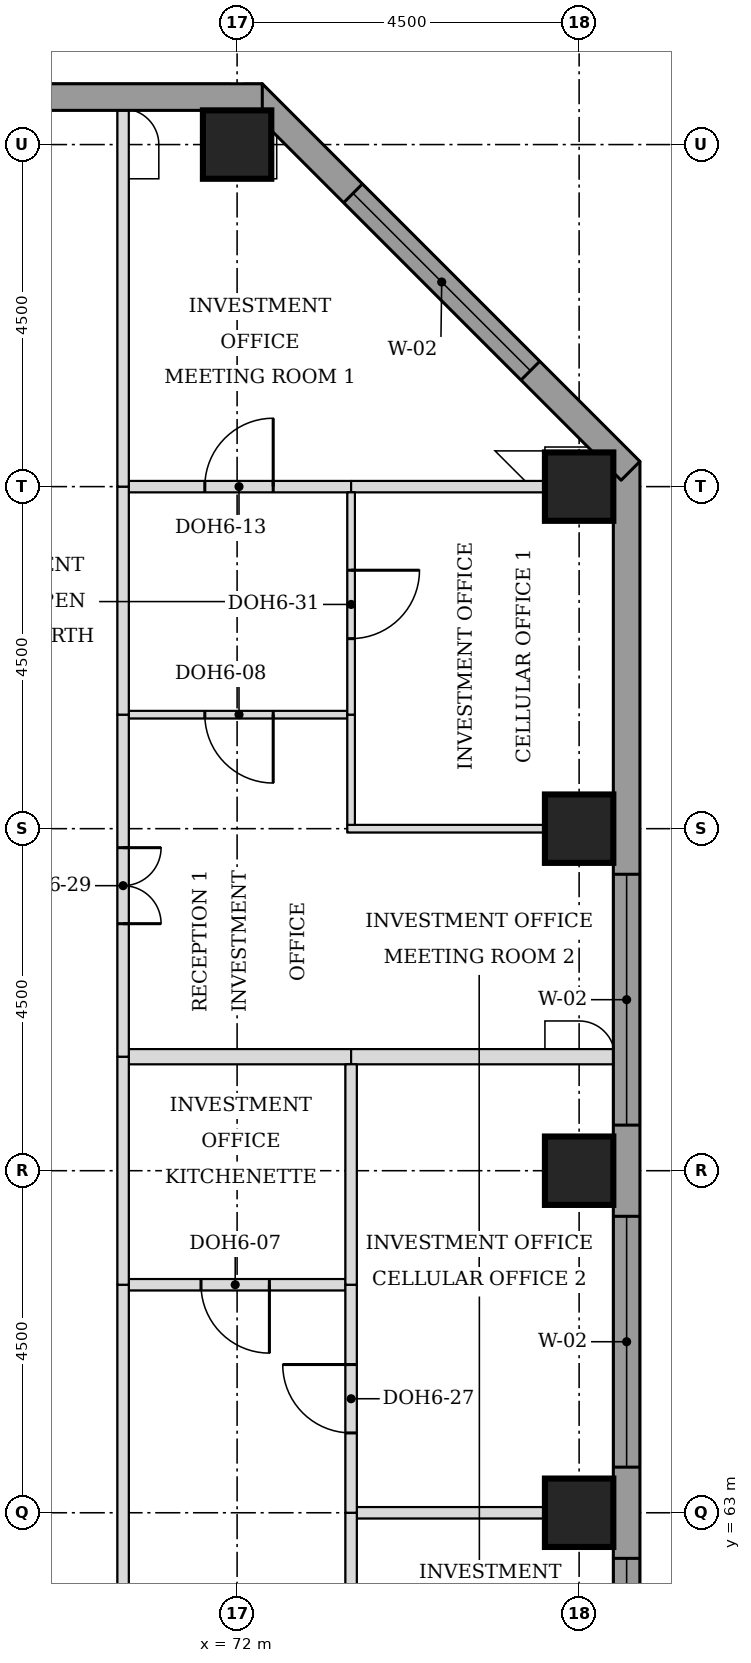
"""IFC4 building model, lengths in metres.
Left out: names, types, materials, properties, quantities, classifications, styles, units other than length and angle.
Written with IfcOpenShell. Run it as: python <this file> out.ifc"""

import sys

from ifc_helpers import new_model, si_unit, direction, frame, frame_2d, origin, origin_2d, place, context, subcontext, project, spatial, rectangle, extrude, element, fill, save


model = new_model("IFC4")
c1 = context("Model", 3, precision=1e-05, world=origin(), true_north=direction((0.0, 1.0)))
c2 = subcontext(c1, "Body", "Model", "MODEL_VIEW")
j1 = project(units=[si_unit("LENGTHUNIT", "METRE"), si_unit("PLANEANGLEUNIT", "RADIAN")], contexts=[c1])
p1 = place(None, origin())
s1 = spatial("IfcSite", under=j1, at=p1, CompositionType="ELEMENT")
p2 = place(p1, origin())
s2 = spatial("IfcBuilding", under=s1, at=p2, CompositionType="ELEMENT")
p3 = place(p2, frame((0.0, 0.0, 188.4)))
s3 = spatial("IfcBuildingStorey", under=s2, at=p3, CompositionType="ELEMENT", Elevation=188.4)
for number, where, z_axis, x_axis in (
    (1, (76.5, 63.0, 0.0), (0.0, 0.0, 1.0), (1.0, 0.0, 0.0)),
    (2, (76.5, 67.5, 0.0), (0.0, 0.0, 1.0), (1.0, 0.0, 0.0)),
    (3, (76.5, 72.0, 0.0), (0.0, 0.0, 1.0), (1.0, 0.0, 0.0)),
    (4, (76.5, 76.5, 0.0), (0.0, 0.0, 1.0), (1.0, 0.0, 0.0)),
    (5, (72.0, 81.0, 0.0), (0.0, 0.0, 1.0), (1.0, 0.0, 0.0)),
):
    element("IfcColumn", number, at=place(p3, frame(where, z_axis=z_axis, x_axis=x_axis)), inside=s3, PredefinedType="COLUMN", context=c2, shape_type="SweptSolid", body=[
        extrude(rectangle(XDim=0.9, YDim=0.9, at=origin_2d()), origin(), (0.0, 0.0, 1.0), 3.7),
    ])
p4 = place(p3, frame((77.125, 44.669, 0.0), z_axis=(0.0, 0.0, 1.0), x_axis=(0.0, 1.0, 0.0)))
e6 = element("IfcWall", 6, at=p4, inside=s3, PredefinedType="STANDARD", context=c2, shape_type="SweptSolid", body=[
    extrude(rectangle(XDim=32.163, YDim=0.35, at=frame_2d((16.081, 0.0))), origin(), (0.0, 0.0, 1.0), 3.525),
])
p5 = place(p4, frame((5.431, 0.0, 0.9)))
e7 = element("IfcOpeningElement", 7, at=p5, cuts=e6, PredefinedType="OPENING", context=c2, shape_type="SweptSolid", body=[
    extrude(rectangle(XDim=3.3, YDim=1.9, at=frame_2d((1.65, 0.95))), frame((0.0, 0.185, 0.0), z_axis=(0.0, -1.0, 0.0), x_axis=(1.0, 0.0, 0.0)), (0.0, 0.0, 1.0), 0.37),
])
p6 = place(p4, frame((9.931, 0.0, 0.9)))
e8 = element("IfcOpeningElement", 8, at=p6, cuts=e6, PredefinedType="OPENING", context=c2, shape_type="SweptSolid", body=[
    extrude(rectangle(XDim=3.3, YDim=1.9, at=frame_2d((1.65, 0.95))), frame((0.0, 0.185, 0.0), z_axis=(0.0, -1.0, 0.0), x_axis=(1.0, 0.0, 0.0)), (0.0, 0.0, 1.0), 0.37),
])
p7 = place(p4, frame((14.431, 0.0, 0.9)))
e9 = element("IfcOpeningElement", 9, at=p7, cuts=e6, PredefinedType="OPENING", context=c2, shape_type="SweptSolid", body=[
    extrude(rectangle(XDim=3.3, YDim=1.9, at=frame_2d((1.65, 0.95))), frame((0.0, 0.185, 0.0), z_axis=(0.0, -1.0, 0.0), x_axis=(1.0, 0.0, 0.0)), (0.0, 0.0, 1.0), 0.37),
])
p8 = place(p4, frame((18.931, 0.0, 0.9)))
e10 = element("IfcOpeningElement", 10, at=p8, cuts=e6, PredefinedType="OPENING", context=c2, shape_type="SweptSolid", body=[
    extrude(rectangle(XDim=3.3, YDim=1.9, at=frame_2d((1.65, 0.95))), frame((0.0, 0.185, 0.0), z_axis=(0.0, -1.0, 0.0), x_axis=(1.0, 0.0, 0.0)), (0.0, 0.0, 1.0), 0.37),
])
p9 = place(p4, frame((23.431, 0.0, 0.9)))
e11 = element("IfcOpeningElement", 11, at=p9, cuts=e6, PredefinedType="OPENING", context=c2, shape_type="SweptSolid", body=[
    extrude(rectangle(XDim=3.3, YDim=1.9, at=frame_2d((1.65, 0.95))), frame((0.0, 0.185, 0.0), z_axis=(0.0, -1.0, 0.0), x_axis=(1.0, 0.0, 0.0)), (0.0, 0.0, 1.0), 0.37),
])
p10 = place(p3, frame((77.176, 76.708, 0.0), z_axis=(0.0, 0.0, 1.0), x_axis=(-0.707106781187, 0.707106781187, 0.0)))
e12 = element("IfcWall", 12, at=p10, inside=s3, PredefinedType="STANDARD", context=c2, shape_type="SweptSolid", body=[
    extrude(rectangle(XDim=7.027, YDim=0.35, at=frame_2d((3.513, 0.0))), origin(), (0.0, 0.0, 1.0), 3.525),
])
p11 = place(p10, frame((1.863, 0.0, 0.9)))
e13 = element("IfcOpeningElement", 13, at=p11, cuts=e12, PredefinedType="OPENING", context=c2, shape_type="SweptSolid", body=[
    extrude(rectangle(XDim=3.3, YDim=1.9, at=frame_2d((1.65, 0.95))), frame((0.0, 0.185, 0.0), z_axis=(0.0, -1.0, 0.0), x_axis=(1.0, 0.0, 0.0)), (0.0, 0.0, 1.0), 0.37),
])
p12 = place(p3, frame((72.331, 81.625, 0.0), z_axis=(0.0, 0.0, 1.0), x_axis=(-1.0, 0.0, 0.0)))
e14 = element("IfcWall", 14, at=p12, inside=s3, PredefinedType="STANDARD", context=c2, shape_type="SweptSolid", body=[
    extrude(rectangle(XDim=32.163, YDim=0.35, at=frame_2d((16.081, 0.0))), origin(), (0.0, 0.0, 1.0), 3.525),
])
p13 = place(p12, frame((5.431, 0.0, 0.9)))
e15 = element("IfcOpeningElement", 15, at=p13, cuts=e14, PredefinedType="OPENING", context=c2, shape_type="SweptSolid", body=[
    extrude(rectangle(XDim=3.3, YDim=1.9, at=frame_2d((1.65, 0.95))), frame((0.0, 0.185, 0.0), z_axis=(0.0, -1.0, 0.0), x_axis=(1.0, 0.0, 0.0)), (0.0, 0.0, 1.0), 0.37),
])
p14 = place(p12, frame((9.931, 0.0, 0.9)))
e16 = element("IfcOpeningElement", 16, at=p14, cuts=e14, PredefinedType="OPENING", context=c2, shape_type="SweptSolid", body=[
    extrude(rectangle(XDim=3.3, YDim=1.9, at=frame_2d((1.65, 0.95))), frame((0.0, 0.185, 0.0), z_axis=(0.0, -1.0, 0.0), x_axis=(1.0, 0.0, 0.0)), (0.0, 0.0, 1.0), 0.37),
])
p15 = place(p12, frame((14.431, 0.0, 0.9)))
e17 = element("IfcOpeningElement", 17, at=p15, cuts=e14, PredefinedType="OPENING", context=c2, shape_type="SweptSolid", body=[
    extrude(rectangle(XDim=3.3, YDim=1.9, at=frame_2d((1.65, 0.95))), frame((0.0, 0.185, 0.0), z_axis=(0.0, -1.0, 0.0), x_axis=(1.0, 0.0, 0.0)), (0.0, 0.0, 1.0), 0.37),
])
p16 = place(p12, frame((18.931, 0.0, 0.9)))
e18 = element("IfcOpeningElement", 18, at=p16, cuts=e14, PredefinedType="OPENING", context=c2, shape_type="SweptSolid", body=[
    extrude(rectangle(XDim=3.3, YDim=1.9, at=frame_2d((1.65, 0.95))), frame((0.0, 0.185, 0.0), z_axis=(0.0, -1.0, 0.0), x_axis=(1.0, 0.0, 0.0)), (0.0, 0.0, 1.0), 0.37),
])
p17 = place(p12, frame((23.431, 0.0, 0.9)))
e19 = element("IfcOpeningElement", 19, at=p17, cuts=e14, PredefinedType="OPENING", context=c2, shape_type="SweptSolid", body=[
    extrude(rectangle(XDim=3.3, YDim=1.9, at=frame_2d((1.65, 0.95))), frame((0.0, 0.185, 0.0), z_axis=(0.0, -1.0, 0.0), x_axis=(1.0, 0.0, 0.0)), (0.0, 0.0, 1.0), 0.37),
])
p18 = place(p3, frame((73.575, 63.0, 0.0), z_axis=(0.0, 0.0, 1.0), x_axis=(1.0, 0.0, 0.0)))
e20 = element("IfcWall", 20, at=p18, inside=s3, PredefinedType="PARTITIONING", context=c2, shape_type="SweptSolid", body=[
    extrude(rectangle(XDim=3.375, YDim=0.15, at=frame_2d((1.688, 0.0))), origin(), (0.0, 0.0, 1.0), 3.55),
])
p19 = place(p3, frame((70.575, 66.0, 0.0), z_axis=(0.0, 0.0, 1.0), x_axis=(1.0, 0.0, 0.0)))
e21 = element("IfcWall", 21, at=p19, inside=s3, PredefinedType="PARTITIONING", context=c2, shape_type="SweptSolid", body=[
    extrude(rectangle(XDim=2.85, YDim=0.15, at=frame_2d((1.425, 0.0))), origin(), (0.0, 0.0, 1.0), 3.55),
])
p20 = place(p19, frame((0.95, 0.0, 0.0)))
e22 = element("IfcOpeningElement", 22, at=p20, cuts=e21, PredefinedType="OPENING", context=c2, shape_type="SweptSolid", body=[
    extrude(rectangle(XDim=0.9, YDim=2.1, at=frame_2d((0.45, 1.05))), frame((0.0, 0.085, 0.0), z_axis=(0.0, -1.0, 0.0), x_axis=(1.0, 0.0, 0.0)), (0.0, 0.0, 1.0), 0.17),
])
p21 = place(p3, frame((70.575, 69.0, 0.0), z_axis=(0.0, 0.0, 1.0), x_axis=(1.0, 0.0, 0.0)))
e23 = element("IfcWall", 23, at=p21, inside=s3, PredefinedType="PARTITIONING", context=c2, shape_type="SweptSolid", body=[
    extrude(rectangle(XDim=2.925, YDim=0.2, at=frame_2d((1.462, 0.0))), origin(), (0.0, 0.0, 1.0), 3.55),
])
p22 = place(p3, frame((73.5, 69.0, 0.0), z_axis=(0.0, 0.0, 1.0), x_axis=(1.0, 0.0, 0.0)))
e24 = element("IfcWall", 24, at=p22, inside=s3, PredefinedType="PARTITIONING", context=c2, shape_type="SweptSolid", body=[
    extrude(rectangle(XDim=3.45, YDim=0.2, at=frame_2d((1.725, 0.0))), origin(), (0.0, 0.0, 1.0), 3.55),
])
p23 = place(p3, frame((73.45, 72.0, 0.0), z_axis=(0.0, 0.0, 1.0), x_axis=(1.0, 0.0, 0.0)))
e25 = element("IfcWall", 25, at=p23, inside=s3, PredefinedType="PARTITIONING", context=c2, shape_type="SweptSolid", body=[
    extrude(rectangle(XDim=3.5, YDim=0.1, at=frame_2d((1.75, 0.0))), origin(), (0.0, 0.0, 1.0), 3.55),
])
p24 = place(p3, frame((70.575, 73.5, 0.0), z_axis=(0.0, 0.0, 1.0), x_axis=(1.0, 0.0, 0.0)))
e26 = element("IfcWall", 26, at=p24, inside=s3, PredefinedType="PARTITIONING", context=c2, shape_type="SweptSolid", body=[
    extrude(rectangle(XDim=2.875, YDim=0.1, at=frame_2d((1.438, 0.0))), origin(), (0.0, 0.0, 1.0), 3.096),
])
p25 = place(p24, frame((1.0, 0.0, 0.0)))
e27 = element("IfcOpeningElement", 27, at=p25, cuts=e26, PredefinedType="OPENING", context=c2, shape_type="SweptSolid", body=[
    extrude(rectangle(XDim=0.9, YDim=2.1, at=frame_2d((0.45, 1.05))), frame((0.0, 0.06, 0.0), z_axis=(0.0, -1.0, 0.0), x_axis=(1.0, 0.0, 0.0)), (0.0, 0.0, 1.0), 0.12),
])
p26 = place(p3, frame((70.575, 76.5, 0.0), z_axis=(0.0, 0.0, 1.0), x_axis=(1.0, 0.0, 0.0)))
e28 = element("IfcWall", 28, at=p26, inside=s3, PredefinedType="PARTITIONING", context=c2, shape_type="SweptSolid", body=[
    extrude(rectangle(XDim=2.925, YDim=0.15, at=frame_2d((1.462, 0.0))), origin(), (0.0, 0.0, 1.0), 3.096),
])
p27 = place(p26, frame((1.0, 0.0, 0.0)))
e29 = element("IfcOpeningElement", 29, at=p27, cuts=e28, PredefinedType="OPENING", context=c2, shape_type="SweptSolid", body=[
    extrude(rectangle(XDim=0.9, YDim=2.1, at=frame_2d((0.45, 1.05))), frame((0.0, 0.085, 0.0), z_axis=(0.0, -1.0, 0.0), x_axis=(1.0, 0.0, 0.0)), (0.0, 0.0, 1.0), 0.17),
])
p28 = place(p3, frame((73.5, 76.5, 0.0), z_axis=(0.0, 0.0, 1.0), x_axis=(1.0, 0.0, 0.0)))
e30 = element("IfcWall", 30, at=p28, inside=s3, PredefinedType="PARTITIONING", context=c2, shape_type="SweptSolid", body=[
    extrude(rectangle(XDim=2.55, YDim=0.15, at=frame_2d((1.275, 0.0))), origin(), (0.0, 0.0, 1.0), 3.096),
])
p29 = place(p3, frame((70.5, 45.0, 0.0), z_axis=(0.0, 0.0, 1.0), x_axis=(0.0, 1.0, 0.0)))
e31 = element("IfcWall", 31, at=p29, inside=s3, PredefinedType="PARTITIONING", context=c2, shape_type="SweptSolid", body=[
    extrude(rectangle(XDim=21.0, YDim=0.15, at=frame_2d((10.5, 0.0))), origin(), (0.0, 0.0, 1.0), 3.55),
])
p30 = place(p3, frame((73.5, 58.5, 0.0), z_axis=(0.0, 0.0, 1.0), x_axis=(0.0, 1.0, 0.0)))
e32 = element("IfcWall", 32, at=p30, inside=s3, PredefinedType="PARTITIONING", context=c2, shape_type="SweptSolid", body=[
    extrude(rectangle(XDim=4.5, YDim=0.15, at=frame_2d((2.25, 0.0))), origin(), (0.0, 0.0, 1.0), 3.55),
])
p31 = place(p30, frame((1.8, 0.0, 0.0)))
e33 = element("IfcOpeningElement", 33, at=p31, cuts=e32, PredefinedType="OPENING", context=c2, shape_type="SweptSolid", body=[
    extrude(rectangle(XDim=0.9, YDim=2.1, at=frame_2d((0.45, 1.05))), frame((0.0, 0.085, 0.0), z_axis=(0.0, -1.0, 0.0), x_axis=(1.0, 0.0, 0.0)), (0.0, 0.0, 1.0), 0.17),
])
p32 = place(p3, frame((73.5, 63.0, 0.0), z_axis=(0.0, 0.0, 1.0), x_axis=(0.0, 1.0, 0.0)))
e34 = element("IfcWall", 34, at=p32, inside=s3, PredefinedType="PARTITIONING", context=c2, shape_type="SweptSolid", body=[
    extrude(rectangle(XDim=3.0, YDim=0.15, at=frame_2d((1.5, 0.0))), origin(), (0.0, 0.0, 1.0), 3.55),
])
p33 = place(p32, frame((1.05, 0.0, 0.0)))
e35 = element("IfcOpeningElement", 35, at=p33, cuts=e34, PredefinedType="OPENING", context=c2, shape_type="SweptSolid", body=[
    extrude(rectangle(XDim=0.9, YDim=2.1, at=frame_2d((0.45, 1.05))), frame((0.0, 0.085, 0.0), z_axis=(0.0, -1.0, 0.0), x_axis=(1.0, 0.0, 0.0)), (0.0, 0.0, 1.0), 0.17),
])
p34 = place(p3, frame((70.5, 66.0, 0.0), z_axis=(0.0, 0.0, 1.0), x_axis=(0.0, 1.0, 0.0)))
e36 = element("IfcWall", 36, at=p34, inside=s3, PredefinedType="PARTITIONING", context=c2, shape_type="SweptSolid", body=[
    extrude(rectangle(XDim=3.0, YDim=0.15, at=frame_2d((1.5, 0.0))), origin(), (0.0, 0.0, 1.0), 3.55),
])
p35 = place(p3, frame((73.5, 66.0, 0.0), z_axis=(0.0, 0.0, 1.0), x_axis=(0.0, 1.0, 0.0)))
e37 = element("IfcWall", 37, at=p35, inside=s3, PredefinedType="PARTITIONING", context=c2, shape_type="SweptSolid", body=[
    extrude(rectangle(XDim=2.9, YDim=0.15, at=frame_2d((1.45, 0.0))), origin(), (0.0, 0.0, 1.0), 3.55),
])
p36 = place(p3, frame((70.5, 69.0, 0.0), z_axis=(0.0, 0.0, 1.0), x_axis=(0.0, 1.0, 0.0)))
e38 = element("IfcWall", 38, at=p36, inside=s3, PredefinedType="PARTITIONING", context=c2, shape_type="SweptSolid", body=[
    extrude(rectangle(XDim=4.5, YDim=0.15, at=frame_2d((2.25, 0.0))), origin(), (0.0, 0.0, 1.0), 3.55),
])
p37 = place(p36, frame((1.75, 0.0, 0.0)))
e39 = element("IfcOpeningElement", 39, at=p37, cuts=e38, PredefinedType="OPENING", context=c2, shape_type="SweptSolid", body=[
    extrude(rectangle(XDim=1.0, YDim=2.1, at=frame_2d((0.5, 1.05))), frame((0.0, 0.085, 0.0), z_axis=(0.0, -1.0, 0.0), x_axis=(1.0, 0.0, 0.0)), (0.0, 0.0, 1.0), 0.17),
])
p38 = place(p3, frame((73.5, 72.05, 0.0), z_axis=(0.0, 0.0, 1.0), x_axis=(0.0, 1.0, 0.0)))
e40 = element("IfcWall", 40, at=p38, inside=s3, PredefinedType="PARTITIONING", context=c2, shape_type="SweptSolid", body=[
    extrude(rectangle(XDim=1.45, YDim=0.1, at=frame_2d((0.725, 0.0))), origin(), (0.0, 0.0, 1.0), 3.55),
])
p39 = place(p3, frame((70.5, 73.5, 0.0), z_axis=(0.0, 0.0, 1.0), x_axis=(0.0, 1.0, 0.0)))
e41 = element("IfcWall", 41, at=p39, inside=s3, PredefinedType="PARTITIONING", context=c2, shape_type="SweptSolid", body=[
    extrude(rectangle(XDim=3.0, YDim=0.15, at=frame_2d((1.5, 0.0))), origin(), (0.0, 0.0, 1.0), 3.55),
])
p40 = place(p3, frame((73.5, 73.5, 0.0), z_axis=(0.0, 0.0, 1.0), x_axis=(0.0, 1.0, 0.0)))
e42 = element("IfcWall", 42, at=p40, inside=s3, PredefinedType="PARTITIONING", context=c2, shape_type="SweptSolid", body=[
    extrude(rectangle(XDim=2.925, YDim=0.1, at=frame_2d((1.462, 0.0))), origin(), (0.0, 0.0, 1.0), 3.55),
])
p41 = place(p40, frame((1.0, 0.0, 0.0)))
e43 = element("IfcOpeningElement", 43, at=p41, cuts=e42, PredefinedType="OPENING", context=c2, shape_type="SweptSolid", body=[
    extrude(rectangle(XDim=0.9, YDim=2.1, at=frame_2d((0.45, 1.05))), frame((0.0, 0.06, 0.0), z_axis=(0.0, -1.0, 0.0), x_axis=(1.0, 0.0, 0.0)), (0.0, 0.0, 1.0), 0.12),
])
p42 = place(p3, frame((70.5, 76.5, 0.0), z_axis=(0.0, 0.0, 1.0), x_axis=(0.0, 1.0, 0.0)))
e44 = element("IfcWall", 44, at=p42, inside=s3, PredefinedType="PARTITIONING", context=c2, shape_type="SweptSolid", body=[
    extrude(rectangle(XDim=4.95, YDim=0.15, at=frame_2d((2.475, 0.0))), origin(), (0.0, 0.0, 1.0), 3.55),
])
p43 = place(p7, origin())
e45 = element("IfcWindow", 45, at=p43, inside=s3, PartitioningType="SINGLE_PANEL", PredefinedType="WINDOW", context=c2, shape_type="SweptSolid", body=[
    extrude(rectangle(XDim=3.3, YDim=1.9, at=frame_2d((1.65, 0.95))), frame((0.0, 0.085, 0.0), z_axis=(0.0, -1.0, 0.0), x_axis=(1.0, 0.0, 0.0)), (0.0, 0.0, 1.0), 0.06),
])
fill(e9, e45)
p44 = place(p8, origin())
e46 = element("IfcWindow", 46, at=p44, inside=s3, PartitioningType="SINGLE_PANEL", PredefinedType="WINDOW", context=c2, shape_type="SweptSolid", body=[
    extrude(rectangle(XDim=3.3, YDim=1.9, at=frame_2d((1.65, 0.95))), frame((0.0, 0.085, 0.0), z_axis=(0.0, -1.0, 0.0), x_axis=(1.0, 0.0, 0.0)), (0.0, 0.0, 1.0), 0.06),
])
fill(e10, e46)
p45 = place(p9, origin())
e47 = element("IfcWindow", 47, at=p45, inside=s3, PartitioningType="SINGLE_PANEL", PredefinedType="WINDOW", context=c2, shape_type="SweptSolid", body=[
    extrude(rectangle(XDim=3.3, YDim=1.9, at=frame_2d((1.65, 0.95))), frame((0.0, 0.085, 0.0), z_axis=(0.0, -1.0, 0.0), x_axis=(1.0, 0.0, 0.0)), (0.0, 0.0, 1.0), 0.06),
])
fill(e11, e47)
p46 = place(p11, origin())
e48 = element("IfcWindow", 48, at=p46, inside=s3, PartitioningType="SINGLE_PANEL", PredefinedType="WINDOW", context=c2, shape_type="SweptSolid", body=[
    extrude(rectangle(XDim=3.3, YDim=1.9, at=frame_2d((1.65, 0.95))), frame((0.0, 0.085, 0.0), z_axis=(0.0, -1.0, 0.0), x_axis=(1.0, 0.0, 0.0)), (0.0, 0.0, 1.0), 0.06),
])
fill(e13, e48)
p47 = place(p20, frame((0.9, 0.0, 0.0), z_axis=(0.0, 0.0, 1.0), x_axis=(-1.0, 0.0, 0.0)))
e49 = element("IfcDoor", 49, at=p47, inside=s3, OperationType="SINGLE_SWING_LEFT", PredefinedType="DOOR", context=c2, shape_type="SweptSolid", body=[
    extrude(rectangle(XDim=0.9, YDim=2.1, at=frame_2d((0.45, 1.05))), frame((0.0, 0.025, 0.0), z_axis=(0.0, -1.0, 0.0), x_axis=(1.0, 0.0, 0.0)), (0.0, 0.0, 1.0), 0.05),
])
fill(e22, e49)
p48 = place(p33, origin())
e50 = element("IfcDoor", 50, at=p48, inside=s3, OperationType="SINGLE_SWING_RIGHT", PredefinedType="DOOR", context=c2, shape_type="SweptSolid", body=[
    extrude(rectangle(XDim=0.9, YDim=2.1, at=frame_2d((0.45, 1.05))), frame((0.0, 0.025, 0.0), z_axis=(0.0, -1.0, 0.0), x_axis=(1.0, 0.0, 0.0)), (0.0, 0.0, 1.0), 0.05),
])
fill(e35, e50)
p49 = place(p37, frame((1.0, 0.0, 0.0), z_axis=(0.0, 0.0, 1.0), x_axis=(-1.0, 0.0, 0.0)))
e51 = element("IfcDoor", 51, at=p49, inside=s3, OperationType="DOUBLE_DOOR_SINGLE_SWING", PredefinedType="DOOR", context=c2, shape_type="SweptSolid", body=[
    extrude(rectangle(XDim=1.0, YDim=2.1, at=frame_2d((0.5, 1.05))), frame((0.0, 0.025, 0.0), z_axis=(0.0, -1.0, 0.0), x_axis=(1.0, 0.0, 0.0)), (0.0, 0.0, 1.0), 0.05),
])
fill(e39, e51)
p50 = place(p25, frame((0.9, 0.0, 0.0), z_axis=(0.0, 0.0, 1.0), x_axis=(-1.0, 0.0, 0.0)))
e52 = element("IfcDoor", 52, at=p50, inside=s3, OperationType="SINGLE_SWING_LEFT", PredefinedType="DOOR", context=c2, shape_type="SweptSolid", body=[
    extrude(rectangle(XDim=0.9, YDim=2.1, at=frame_2d((0.45, 1.05))), frame((0.0, 0.025, 0.0), z_axis=(0.0, -1.0, 0.0), x_axis=(1.0, 0.0, 0.0)), (0.0, 0.0, 1.0), 0.05),
])
fill(e27, e52)
p51 = place(p41, frame((0.9, 0.0, 0.0), z_axis=(0.0, 0.0, 1.0), x_axis=(-1.0, 0.0, 0.0)))
e53 = element("IfcDoor", 53, at=p51, inside=s3, OperationType="SINGLE_SWING_LEFT", PredefinedType="DOOR", context=c2, shape_type="SweptSolid", body=[
    extrude(rectangle(XDim=0.9, YDim=2.1, at=frame_2d((0.45, 1.05))), frame((0.0, 0.025, 0.0), z_axis=(0.0, -1.0, 0.0), x_axis=(1.0, 0.0, 0.0)), (0.0, 0.0, 1.0), 0.05),
])
fill(e43, e53)
p52 = place(p27, origin())
e54 = element("IfcDoor", 54, at=p52, inside=s3, OperationType="SINGLE_SWING_RIGHT", PredefinedType="DOOR", context=c2, shape_type="SweptSolid", body=[
    extrude(rectangle(XDim=0.9, YDim=2.1, at=frame_2d((0.45, 1.05))), frame((0.0, 0.025, 0.0), z_axis=(0.0, -1.0, 0.0), x_axis=(1.0, 0.0, 0.0)), (0.0, 0.0, 1.0), 0.05),
])
fill(e29, e54)
save(model, sys.argv[1])
